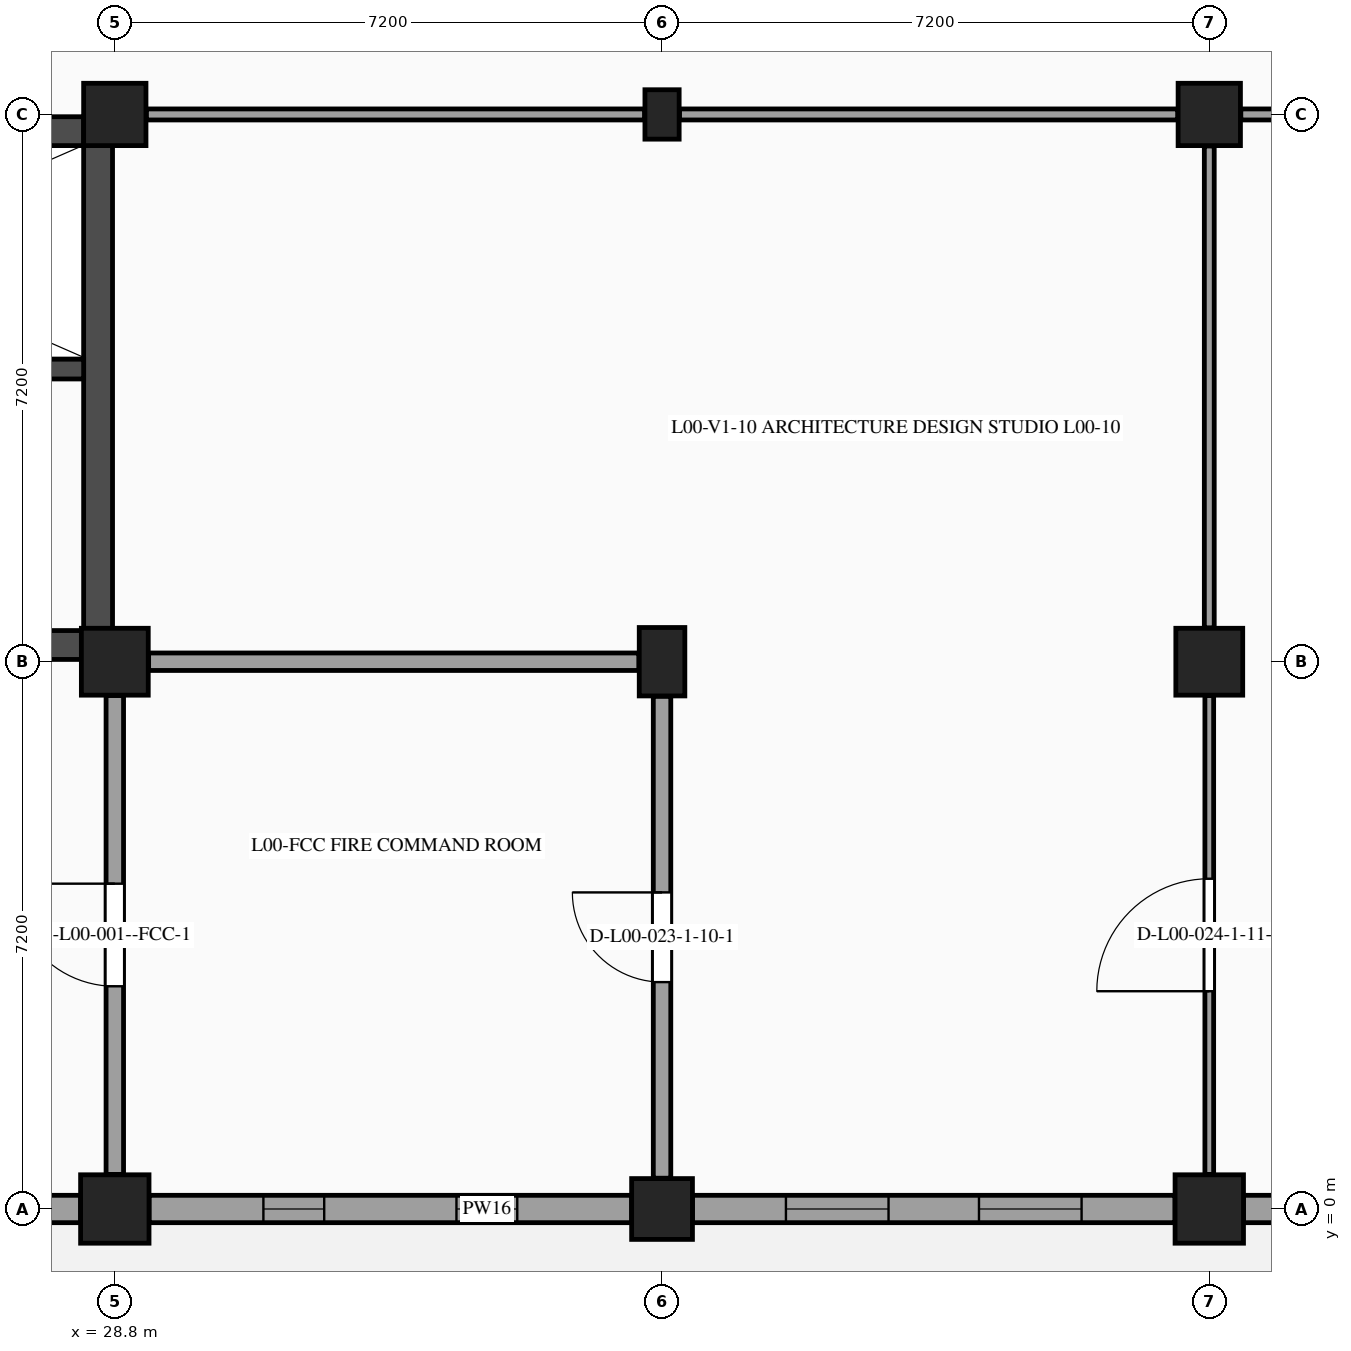
"""IFC4 building model, lengths in metres.
Left out: names, types, materials, properties, quantities, classifications, styles, units other than length and angle.
Written with IfcOpenShell. Run it as: python <this file> out.ifc"""

import sys

from ifc_helpers import new_model, si_unit, direction, frame, frame_2d, origin, origin_2d, place, context, subcontext, project, spatial, rectangle, extrude, element, fill, save


model = new_model("IFC4")
c1 = context("Model", 3, precision=1e-05, world=origin(), true_north=direction((0.0, 1.0)))
c2 = subcontext(c1, "Body", "Model", "MODEL_VIEW")
j1 = project(units=[si_unit("LENGTHUNIT", "METRE"), si_unit("PLANEANGLEUNIT", "RADIAN")], contexts=[c1])
p1 = place(None, origin())
s1 = spatial("IfcSite", under=j1, at=p1, CompositionType="ELEMENT")
p2 = place(p1, origin())
s2 = spatial("IfcBuilding", under=s1, at=p2, CompositionType="ELEMENT")
p3 = place(p2, origin())
s3 = spatial("IfcBuildingStorey", under=s2, at=p3, CompositionType="ELEMENT", Elevation=0.0)
p4 = place(p3, frame((28.8, 0.0, 0.0), z_axis=(0.0, 0.0, 1.0), x_axis=(1.0, 0.0, 0.0)))
e1 = element("IfcColumn", 1, at=p4, inside=s3, PredefinedType="COLUMN", context=c2, shape_type="SweptSolid", body=[
    extrude(rectangle(XDim=0.9, YDim=0.9, at=origin_2d()), origin(), (0.0, 0.0, 1.0), 5.4),
])
p5 = place(p3, frame((28.8, 7.2, 0.0), z_axis=(0.0, 0.0, 1.0), x_axis=(1.0, 0.0, 0.0)))
e2 = element("IfcColumn", 2, at=p5, inside=s3, PredefinedType="COLUMN", context=c2, shape_type="SweptSolid", body=[
    extrude(rectangle(XDim=0.88, YDim=0.88, at=origin_2d()), origin(), (0.0, 0.0, 1.0), 5.4),
])
p6 = place(p3, frame((28.8, 14.4, 0.0), z_axis=(0.0, 0.0, 1.0), x_axis=(1.0, 0.0, 0.0)))
e3 = element("IfcColumn", 3, at=p6, inside=s3, PredefinedType="COLUMN", context=c2, shape_type="SweptSolid", body=[
    extrude(rectangle(XDim=0.82, YDim=0.82, at=origin_2d()), origin(), (0.0, 0.0, 1.0), 5.4),
])
p7 = place(p3, frame((36.0, 0.0, 0.0), z_axis=(0.0, 0.0, 1.0), x_axis=(1.0, 0.0, 0.0)))
e4 = element("IfcColumn", 4, at=p7, inside=s3, PredefinedType="COLUMN", context=c2, shape_type="SweptSolid", body=[
    extrude(rectangle(XDim=0.8, YDim=0.8, at=origin_2d()), origin(), (0.0, 0.0, 1.0), 5.4),
])
p8 = place(p3, frame((36.0, 7.2, 0.0), z_axis=(0.0, 0.0, 1.0), x_axis=(1.0, 0.0, 0.0)))
e5 = element("IfcColumn", 5, at=p8, inside=s3, PredefinedType="COLUMN", context=c2, shape_type="SweptSolid", body=[
    extrude(rectangle(XDim=0.6, YDim=0.9, at=origin_2d()), origin(), (0.0, 0.0, 1.0), 5.4),
])
p9 = place(p3, frame((36.0, 14.4, 0.0), z_axis=(0.0, 0.0, 1.0), x_axis=(1.0, 0.0, 0.0)))
e6 = element("IfcColumn", 6, at=p9, inside=s3, PredefinedType="PILASTER", context=c2, shape_type="SweptSolid", body=[
    extrude(rectangle(XDim=0.45, YDim=0.65, at=origin_2d()), origin(), (0.0, 0.0, 1.0), 5.4),
])
p10 = place(p3, frame((43.2, 0.0, 0.0), z_axis=(0.0, 0.0, 1.0), x_axis=(1.0, 0.0, 0.0)))
e7 = element("IfcColumn", 7, at=p10, inside=s3, PredefinedType="COLUMN", context=c2, shape_type="SweptSolid", body=[
    extrude(rectangle(XDim=0.9, YDim=0.9, at=origin_2d()), origin(), (0.0, 0.0, 1.0), 5.4),
])
p11 = place(p3, frame((43.2, 7.2, 0.0), z_axis=(0.0, 0.0, 1.0), x_axis=(1.0, 0.0, 0.0)))
e8 = element("IfcColumn", 8, at=p11, inside=s3, PredefinedType="COLUMN", context=c2, shape_type="SweptSolid", body=[
    extrude(rectangle(XDim=0.88, YDim=0.88, at=origin_2d()), origin(), (0.0, 0.0, 1.0), 5.4),
])
p12 = place(p3, frame((43.2, 14.4, 0.0), z_axis=(0.0, 0.0, 1.0), x_axis=(1.0, 0.0, 0.0)))
e9 = element("IfcColumn", 9, at=p12, inside=s3, PredefinedType="COLUMN", context=c2, shape_type="SweptSolid", body=[
    extrude(rectangle(XDim=0.82, YDim=0.82, at=origin_2d()), origin(), (0.0, 0.0, 1.0), 5.4),
])
p13 = place(p3, frame((50.0, 0.0, 0.0), z_axis=(0.0, 0.0, 1.0), x_axis=(-1.0, 0.0, 0.0)))
e10 = element("IfcWall", 10, at=p13, inside=s3, PredefinedType="STANDARD", context=c2, shape_type="SweptSolid", body=[
    extrude(rectangle(XDim=6.35, YDim=0.36, at=frame_2d((3.175, 0.0))), origin(), (0.0, 0.0, 1.0), 4.37),
])
p14 = place(p13, frame((1.155, 0.0, 1.15)))
e11 = element("IfcOpeningElement", 11, at=p14, cuts=e10, PredefinedType="OPENING", context=c2, shape_type="SweptSolid", body=[
    extrude(rectangle(XDim=1.5, YDim=1.2, at=frame_2d((0.75, 0.6))), frame((0.0, 0.19, 0.0), z_axis=(0.0, -1.0, 0.0), x_axis=(1.0, 0.0, 0.0)), (0.0, 0.0, 1.0), 0.38),
])
p15 = place(p13, frame((3.695, 0.0, 1.15)))
e12 = element("IfcOpeningElement", 12, at=p15, cuts=e10, PredefinedType="OPENING", context=c2, shape_type="SweptSolid", body=[
    extrude(rectangle(XDim=1.5, YDim=1.2, at=frame_2d((0.75, 0.6))), frame((0.0, 0.19, 0.0), z_axis=(0.0, -1.0, 0.0), x_axis=(1.0, 0.0, 0.0)), (0.0, 0.0, 1.0), 0.38),
])
p16 = place(p3, frame((42.75, 0.0, 0.0), z_axis=(0.0, 0.0, 1.0), x_axis=(-1.0, 0.0, 0.0)))
e13 = element("IfcWall", 13, at=p16, inside=s3, PredefinedType="STANDARD", context=c2, shape_type="SweptSolid", body=[
    extrude(rectangle(XDim=6.35, YDim=0.36, at=frame_2d((3.175, 0.0))), origin(), (0.0, 0.0, 1.0), 4.37),
])
p17 = place(p16, frame((1.23, 0.0, 1.15)))
e14 = element("IfcOpeningElement", 14, at=p17, cuts=e13, PredefinedType="OPENING", context=c2, shape_type="SweptSolid", body=[
    extrude(rectangle(XDim=1.35, YDim=1.1, at=frame_2d((0.675, 0.55))), frame((0.0, 0.19, 0.0), z_axis=(0.0, -1.0, 0.0), x_axis=(1.0, 0.0, 0.0)), (0.0, 0.0, 1.0), 0.38),
])
p18 = place(p16, frame((3.77, 0.0, 1.15)))
e15 = element("IfcOpeningElement", 15, at=p18, cuts=e13, PredefinedType="OPENING", context=c2, shape_type="SweptSolid", body=[
    extrude(rectangle(XDim=1.35, YDim=1.1, at=frame_2d((0.675, 0.55))), frame((0.0, 0.19, 0.0), z_axis=(0.0, -1.0, 0.0), x_axis=(1.0, 0.0, 0.0)), (0.0, 0.0, 1.0), 0.38),
])
p19 = place(p3, frame((35.6, 0.0, 0.0), z_axis=(0.0, 0.0, 1.0), x_axis=(-1.0, 0.0, 0.0)))
e16 = element("IfcWall", 16, at=p19, inside=s3, PredefinedType="STANDARD", context=c2, shape_type="SweptSolid", body=[
    extrude(rectangle(XDim=6.35, YDim=0.36, at=frame_2d((3.175, 0.0))), origin(), (0.0, 0.0, 1.0), 4.37),
])
p20 = place(p19, frame((1.505, 0.0, 1.15)))
e17 = element("IfcOpeningElement", 17, at=p20, cuts=e16, PredefinedType="OPENING", context=c2, shape_type="SweptSolid", body=[
    extrude(rectangle(XDim=0.8, YDim=1.5, at=frame_2d((0.4, 0.75))), frame((0.0, 0.19, 0.0), z_axis=(0.0, -1.0, 0.0), x_axis=(1.0, 0.0, 0.0)), (0.0, 0.0, 1.0), 0.38),
])
p21 = place(p19, frame((4.045, 0.0, 1.15)))
e18 = element("IfcOpeningElement", 18, at=p21, cuts=e16, PredefinedType="OPENING", context=c2, shape_type="SweptSolid", body=[
    extrude(rectangle(XDim=0.8, YDim=1.5, at=frame_2d((0.4, 0.75))), frame((0.0, 0.19, 0.0), z_axis=(0.0, -1.0, 0.0), x_axis=(1.0, 0.0, 0.0)), (0.0, 0.0, 1.0), 0.38),
])
p22 = place(p3, frame((28.35, 0.0, 0.0), z_axis=(0.0, 0.0, 1.0), x_axis=(-1.0, 0.0, 0.0)))
e19 = element("IfcWall", 19, at=p22, inside=s3, PredefinedType="STANDARD", context=c2, shape_type="SweptSolid", body=[
    extrude(rectangle(XDim=6.35, YDim=0.36, at=frame_2d((3.175, 0.0))), origin(), (0.0, 0.0, 1.0), 4.37),
])
p23 = place(p22, frame((2.375, 0.0, 0.0)))
e20 = element("IfcOpeningElement", 20, at=p23, cuts=e19, PredefinedType="OPENING", context=c2, shape_type="SweptSolid", body=[
    extrude(rectangle(XDim=1.6, YDim=2.3, at=frame_2d((0.8, 1.15))), frame((0.0, 0.19, 0.0), z_axis=(0.0, -1.0, 0.0), x_axis=(1.0, 0.0, 0.0)), (0.0, 0.0, 1.0), 0.38),
])
p24 = place(p3, frame((21.79, 7.42, 0.0), z_axis=(0.0, 0.0, 1.0), x_axis=(1.0, 0.0, 0.0)))
e21 = element("IfcWall", 21, at=p24, inside=s3, PredefinedType="SHEAR", context=c2, shape_type="SweptSolid", body=[
    extrude(rectangle(XDim=6.6, YDim=0.38, at=frame_2d((3.3, 0.0))), origin(), (0.0, 0.0, 1.0), 5.09),
])
p25 = place(p24, frame((2.22, 0.0, 0.0)))
e22 = element("IfcOpeningElement", 22, at=p25, cuts=e21, PredefinedType="OPENING", context=c2, shape_type="SweptSolid", body=[
    extrude(rectangle(XDim=1.8, YDim=2.2, at=frame_2d((0.9, 1.1))), frame((0.0, 0.2, 0.0), z_axis=(0.0, -1.0, 0.0), x_axis=(1.0, 0.0, 0.0)), (0.0, 0.0, 1.0), 0.4),
])
p26 = place(p3, frame((28.58, 7.23, 0.0), z_axis=(0.0, 0.0, 1.0), x_axis=(0.0, 1.0, 0.0)))
e23 = element("IfcWall", 23, at=p26, inside=s3, PredefinedType="SHEAR", context=c2, shape_type="SweptSolid", body=[
    extrude(rectangle(XDim=7.14, YDim=0.38, at=frame_2d((3.57, 0.0))), origin(), (0.0, 0.0, 1.0), 5.09),
])
p27 = place(p3, frame((21.79, 14.18, 0.0), z_axis=(0.0, 0.0, 1.0), x_axis=(1.0, 0.0, 0.0)))
e24 = element("IfcWall", 24, at=p27, inside=s3, PredefinedType="SHEAR", context=c2, shape_type="SweptSolid", body=[
    extrude(rectangle(XDim=6.6, YDim=0.38, at=frame_2d((3.3, 0.0))), origin(), (0.0, 0.0, 1.0), 5.09),
])
p28 = place(p3, frame((21.79, 11.05, 0.0), z_axis=(0.0, 0.0, 1.0), x_axis=(1.0, 0.0, 0.0)))
e25 = element("IfcWall", 25, at=p28, inside=s3, PredefinedType="SHEAR", context=c2, shape_type="SweptSolid", body=[
    extrude(rectangle(XDim=6.6, YDim=0.26, at=frame_2d((3.3, 0.0))), origin(), (0.0, 0.0, 1.0), 5.09),
])
p29 = place(p28, frame((0.95, 0.0, 0.0)))
e26 = element("IfcOpeningElement", 26, at=p29, cuts=e25, PredefinedType="OPENING", context=c2, shape_type="SweptSolid", body=[
    extrude(rectangle(XDim=1.1, YDim=2.2, at=frame_2d((0.55, 1.1))), frame((0.0, 0.14, 0.0), z_axis=(0.0, -1.0, 0.0), x_axis=(1.0, 0.0, 0.0)), (0.0, 0.0, 1.0), 0.28),
])
p30 = place(p28, frame((4.1, 0.0, 0.0)))
e27 = element("IfcOpeningElement", 27, at=p30, cuts=e25, PredefinedType="OPENING", context=c2, shape_type="SweptSolid", body=[
    extrude(rectangle(XDim=1.0, YDim=2.15, at=frame_2d((0.5, 1.075))), frame((0.0, 0.14, 0.0), z_axis=(0.0, -1.0, 0.0), x_axis=(1.0, 0.0, 0.0)), (0.0, 0.0, 1.0), 0.28),
])
p31 = place(p3, frame((28.8, 0.455, 0.0), z_axis=(0.0, 0.0, 1.0), x_axis=(0.0, 1.0, 0.0)))
e28 = element("IfcWall", 28, at=p31, inside=s3, PredefinedType="PARTITIONING", context=c2, shape_type="SweptSolid", body=[
    extrude(rectangle(XDim=6.3, YDim=0.23, at=frame_2d((3.15, 0.0))), origin(), (0.0, 0.0, 1.0), 4.455),
])
p32 = place(p31, frame((2.475, 0.0, 0.0)))
e29 = element("IfcOpeningElement", 29, at=p32, cuts=e28, PredefinedType="OPENING", context=c2, shape_type="SweptSolid", body=[
    extrude(rectangle(XDim=1.35, YDim=2.15, at=frame_2d((0.675, 1.075))), frame((0.0, 0.125, 0.0), z_axis=(0.0, -1.0, 0.0), x_axis=(1.0, 0.0, 0.0)), (0.0, 0.0, 1.0), 0.25),
])
p33 = place(p3, frame((36.0, 0.405, 0.0), z_axis=(0.0, 0.0, 1.0), x_axis=(0.0, 1.0, 0.0)))
e30 = element("IfcWall", 30, at=p33, inside=s3, PredefinedType="PARTITIONING", context=c2, shape_type="SweptSolid", body=[
    extrude(rectangle(XDim=6.34, YDim=0.23, at=frame_2d((3.17, 0.0))), origin(), (0.0, 0.0, 1.0), 4.455),
])
p34 = place(p33, frame((2.58, 0.0, 0.0)))
e31 = element("IfcOpeningElement", 31, at=p34, cuts=e30, PredefinedType="OPENING", context=c2, shape_type="SweptSolid", body=[
    extrude(rectangle(XDim=1.18, YDim=2.18, at=frame_2d((0.59, 1.09))), frame((0.0, 0.125, 0.0), z_axis=(0.0, -1.0, 0.0), x_axis=(1.0, 0.0, 0.0)), (0.0, 0.0, 1.0), 0.25),
])
p35 = place(p3, frame((29.245, 7.2, 0.0), z_axis=(0.0, 0.0, 1.0), x_axis=(1.0, 0.0, 0.0)))
e32 = element("IfcWall", 32, at=p35, inside=s3, PredefinedType="PARTITIONING", context=c2, shape_type="SweptSolid", body=[
    extrude(rectangle(XDim=6.45, YDim=0.23, at=frame_2d((3.225, 0.0))), origin(), (0.0, 0.0, 1.0), 4.37),
])
p36 = place(p3, frame((29.215, 14.4, 0.0), z_axis=(0.0, 0.0, 1.0), x_axis=(1.0, 0.0, 0.0)))
e33 = element("IfcWall", 33, at=p36, inside=s3, PredefinedType="PARTITIONING", context=c2, shape_type="SweptSolid", body=[
    extrude(rectangle(XDim=6.555, YDim=0.145, at=frame_2d((3.277, 0.0))), origin(), (0.0, 0.0, 1.0), 4.37),
])
p37 = place(p3, frame((43.2, 0.455, 0.0), z_axis=(0.0, 0.0, 1.0), x_axis=(0.0, 1.0, 0.0)))
e34 = element("IfcWall", 34, at=p37, inside=s3, PredefinedType="PARTITIONING", context=c2, shape_type="SweptSolid", body=[
    extrude(rectangle(XDim=6.3, YDim=0.115, at=frame_2d((3.15, 0.0))), origin(), (0.0, 0.0, 1.0), 4.455),
])
p38 = place(p37, frame((2.41, 0.0, 0.0)))
e35 = element("IfcOpeningElement", 35, at=p38, cuts=e34, PredefinedType="OPENING", context=c2, shape_type="SweptSolid", body=[
    extrude(rectangle(XDim=1.48, YDim=2.28, at=frame_2d((0.74, 1.14))), frame((0.0, 0.067, 0.0), z_axis=(0.0, -1.0, 0.0), x_axis=(1.0, 0.0, 0.0)), (0.0, 0.0, 1.0), 0.135),
])
p39 = place(p3, frame((43.2, 7.645, 0.0), z_axis=(0.0, 0.0, 1.0), x_axis=(0.0, 1.0, 0.0)))
e36 = element("IfcWall", 36, at=p39, inside=s3, PredefinedType="PARTITIONING", context=c2, shape_type="SweptSolid", body=[
    extrude(rectangle(XDim=6.34, YDim=0.13, at=frame_2d((3.17, 0.0))), origin(), (0.0, 0.0, 1.0), 4.405),
])
p40 = place(p3, frame((36.23, 14.4, 0.0), z_axis=(0.0, 0.0, 1.0), x_axis=(1.0, 0.0, 0.0)))
e37 = element("IfcWall", 37, at=p40, inside=s3, PredefinedType="PARTITIONING", context=c2, shape_type="SweptSolid", body=[
    extrude(rectangle(XDim=6.555, YDim=0.145, at=frame_2d((3.277, 0.0))), origin(), (0.0, 0.0, 1.0), 4.39),
])
p41 = place(p3, frame((43.615, 14.4, 0.0), z_axis=(0.0, 0.0, 1.0), x_axis=(1.0, 0.0, 0.0)))
e38 = element("IfcWall", 38, at=p41, inside=s3, PredefinedType="PARTITIONING", context=c2, shape_type="SweptSolid", body=[
    extrude(rectangle(XDim=6.555, YDim=0.145, at=frame_2d((3.277, 0.0))), origin(), (0.0, 0.0, 1.0), 4.43),
])
p42 = place(p17, origin())
e39 = element("IfcWindow", 39, at=p42, inside=s3, PartitioningType="SINGLE_PANEL", PredefinedType="WINDOW", context=c2, shape_type="SweptSolid", body=[
    extrude(rectangle(XDim=1.35, YDim=1.1, at=frame_2d((0.675, 0.55))), frame((0.0, -0.08, 0.0), z_axis=(0.0, -1.0, 0.0), x_axis=(1.0, 0.0, 0.0)), (0.0, 0.0, 1.0), 0.06),
])
fill(e14, e39)
p43 = place(p18, origin())
e40 = element("IfcWindow", 40, at=p43, inside=s3, PartitioningType="SINGLE_PANEL", PredefinedType="WINDOW", context=c2, shape_type="SweptSolid", body=[
    extrude(rectangle(XDim=1.35, YDim=1.1, at=frame_2d((0.675, 0.55))), frame((0.0, -0.08, 0.0), z_axis=(0.0, -1.0, 0.0), x_axis=(1.0, 0.0, 0.0)), (0.0, 0.0, 1.0), 0.06),
])
fill(e15, e40)
p44 = place(p20, origin())
e41 = element("IfcWindow", 41, at=p44, inside=s3, PartitioningType="SINGLE_PANEL", PredefinedType="WINDOW", context=c2, shape_type="SweptSolid", body=[
    extrude(rectangle(XDim=0.8, YDim=1.5, at=frame_2d((0.4, 0.75))), frame((0.0, -0.08, 0.0), z_axis=(0.0, -1.0, 0.0), x_axis=(1.0, 0.0, 0.0)), (0.0, 0.0, 1.0), 0.06),
])
fill(e17, e41)
p45 = place(p21, origin())
e42 = element("IfcWindow", 42, at=p45, inside=s3, PartitioningType="SINGLE_PANEL", PredefinedType="WINDOW", context=c2, shape_type="SweptSolid", body=[
    extrude(rectangle(XDim=0.8, YDim=1.5, at=frame_2d((0.4, 0.75))), frame((0.0, -0.08, 0.0), z_axis=(0.0, -1.0, 0.0), x_axis=(1.0, 0.0, 0.0)), (0.0, 0.0, 1.0), 0.06),
])
fill(e18, e42)
p46 = place(p32, origin())
e43 = element("IfcDoor", 43, at=p46, inside=s3, OperationType="SINGLE_SWING_RIGHT", PredefinedType="DOOR", context=c2, shape_type="SweptSolid", body=[
    extrude(rectangle(XDim=1.35, YDim=2.15, at=frame_2d((0.675, 1.075))), frame((0.0, 0.025, 0.0), z_axis=(0.0, -1.0, 0.0), x_axis=(1.0, 0.0, 0.0)), (0.0, 0.0, 1.0), 0.05),
])
fill(e29, e43)
p47 = place(p34, origin())
e44 = element("IfcDoor", 44, at=p47, inside=s3, OperationType="SINGLE_SWING_RIGHT", PredefinedType="DOOR", context=c2, shape_type="SweptSolid", body=[
    extrude(rectangle(XDim=1.18, YDim=2.18, at=frame_2d((0.59, 1.09))), frame((0.0, 0.025, 0.0), z_axis=(0.0, -1.0, 0.0), x_axis=(1.0, 0.0, 0.0)), (0.0, 0.0, 1.0), 0.05),
])
fill(e31, e44)
p48 = place(p38, origin())
e45 = element("IfcDoor", 45, at=p48, inside=s3, OperationType="SINGLE_SWING_LEFT", PredefinedType="DOOR", context=c2, shape_type="SweptSolid", body=[
    extrude(rectangle(XDim=1.48, YDim=2.28, at=frame_2d((0.74, 1.14))), frame((0.0, 0.025, 0.0), z_axis=(0.0, -1.0, 0.0), x_axis=(1.0, 0.0, 0.0)), (0.0, 0.0, 1.0), 0.05),
])
fill(e35, e45)
save(model, sys.argv[1])
